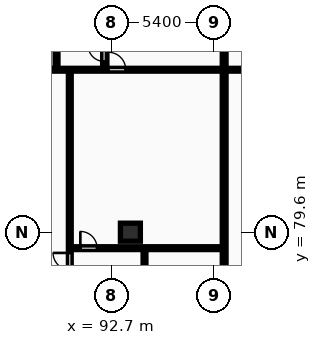
"""IFC4 building model, lengths in metres.
Left out: names, types, materials, properties, quantities, classifications, styles, units other than length and angle.
Written with IfcOpenShell. Run it as: python <this file> out.ifc"""

import sys

from ifc_helpers import new_model, si_unit, direction, frame, frame_2d, origin, origin_2d, place, context, subcontext, project, spatial, rectangle, extrude, element, fill, save


model = new_model("IFC4")
c1 = context("Model", 3, precision=1e-05, world=origin(), true_north=direction((0.0, 1.0)))
c2 = subcontext(c1, "Body", "Model", "MODEL_VIEW")
j1 = project(units=[si_unit("LENGTHUNIT", "METRE"), si_unit("PLANEANGLEUNIT", "RADIAN")], contexts=[c1])
p1 = place(None, origin())
s1 = spatial("IfcSite", under=j1, at=p1, CompositionType="ELEMENT")
p2 = place(p1, origin())
s2 = spatial("IfcBuilding", under=s1, at=p2, CompositionType="ELEMENT")
p3 = place(p2, frame((0.0, 0.0, 24.0)))
s3 = spatial("IfcBuildingStorey", under=s2, at=p3, CompositionType="ELEMENT", Elevation=24.0)
p4 = place(p3, frame((93.7, 79.6, 0.0), z_axis=(0.0, 0.0, 1.0), x_axis=(1.0, 0.0, 0.0)))
e1 = element("IfcColumn", 1, at=p4, inside=s3, PredefinedType="COLUMN", context=c2, shape_type="SweptSolid", body=[
    extrude(rectangle(XDim=1.05, YDim=0.95, at=origin_2d()), origin(), (0.0, 0.0, 1.0), 3.25),
])
p5 = place(p3, frame((98.635, 69.43, 0.0), z_axis=(0.0, 0.0, 1.0), x_axis=(0.0, 1.0, 0.0)))
e2 = element("IfcWall", 2, at=p5, inside=s3, PredefinedType="PARTITIONING", context=c2, shape_type="SweptSolid", body=[
    extrude(rectangle(XDim=29.07, YDim=0.2, at=frame_2d((14.535, 0.0))), origin(), (0.0, 0.0, 1.0), 2.97),
])
p6 = place(p3, frame((94.443, 69.41, 0.0), z_axis=(0.0, 0.0, 1.0), x_axis=(0.0, 1.0, 0.0)))
e3 = element("IfcWall", 3, at=p6, inside=s3, PredefinedType="PARTITIONING", context=c2, shape_type="SweptSolid", body=[
    extrude(rectangle(XDim=9.35, YDim=0.15, at=frame_2d((4.675, 0.0))), origin(), (0.0, 0.0, 1.0), 2.97),
])
p7 = place(p6, frame((4.255, 0.0, 0.0)))
e4 = element("IfcOpeningElement", 4, at=p7, cuts=e3, PredefinedType="OPENING", context=c2, shape_type="SweptSolid", body=[
    extrude(rectangle(XDim=0.84, YDim=2.04, at=frame_2d((0.42, 1.02))), frame((0.0, 0.085, 0.0), z_axis=(0.0, -1.0, 0.0), x_axis=(1.0, 0.0, 0.0)), (0.0, 0.0, 1.0), 0.17),
])
p8 = place(p3, frame((90.572, 78.76, 0.0), z_axis=(0.0, 0.0, 1.0), x_axis=(1.0, 0.0, 0.0)))
e5 = element("IfcWall", 5, at=p8, inside=s3, PredefinedType="PARTITIONING", context=c2, shape_type="SweptSolid", body=[
    extrude(rectangle(XDim=7.983, YDim=0.15, at=frame_2d((3.992, 0.0))), origin(), (0.0, 0.0, 1.0), 2.97),
])
p9 = place(p8, frame((0.495, 0.0, 0.0)))
e6 = element("IfcOpeningElement", 6, at=p9, cuts=e5, PredefinedType="OPENING", context=c2, shape_type="SweptSolid", body=[
    extrude(rectangle(XDim=0.88, YDim=2.06, at=frame_2d((0.44, 1.03))), frame((0.0, 0.085, 0.0), z_axis=(0.0, -1.0, 0.0), x_axis=(1.0, 0.0, 0.0)), (0.0, 0.0, 1.0), 0.17),
])
p10 = place(p3, frame((90.511, 69.41, 0.0), z_axis=(0.0, 0.0, 1.0), x_axis=(0.0, 1.0, 0.0)))
e7 = element("IfcWall", 7, at=p10, inside=s3, PredefinedType="PARTITIONING", context=c2, shape_type="SweptSolid", body=[
    extrude(rectangle(XDim=18.7, YDim=0.15, at=frame_2d((9.35, 0.0))), origin(), (0.0, 0.0, 1.0), 2.97),
])
p11 = place(p10, frame((8.22, 0.0, 0.0)))
e8 = element("IfcOpeningElement", 8, at=p11, cuts=e7, PredefinedType="OPENING", context=c2, shape_type="SweptSolid", body=[
    extrude(rectangle(XDim=0.88, YDim=2.06, at=frame_2d((0.44, 1.03))), frame((0.0, 0.085, 0.0), z_axis=(0.0, -1.0, 0.0), x_axis=(1.0, 0.0, 0.0)), (0.0, 0.0, 1.0), 0.17),
])
p12 = place(p3, frame((89.815, 88.19, 0.0), z_axis=(0.0, 0.0, 1.0), x_axis=(0.0, 1.0, 0.0)))
e9 = element("IfcWall", 9, at=p12, inside=s3, PredefinedType="PARTITIONING", context=c2, shape_type="SweptSolid", body=[
    extrude(rectangle(XDim=5.0, YDim=0.15, at=frame_2d((2.5, 0.0))), origin(), (0.0, 0.0, 1.0), 2.97),
])
p13 = place(p12, frame((2.08, 0.0, 0.0)))
e10 = element("IfcOpeningElement", 10, at=p13, cuts=e9, PredefinedType="OPENING", context=c2, shape_type="SweptSolid", body=[
    extrude(rectangle(XDim=0.84, YDim=2.04, at=frame_2d((0.42, 1.02))), frame((0.0, 0.085, 0.0), z_axis=(0.0, -1.0, 0.0), x_axis=(1.0, 0.0, 0.0)), (0.0, 0.0, 1.0), 0.17),
])
p14 = place(p3, frame((92.315, 88.19, 0.0), z_axis=(0.0, 0.0, 1.0), x_axis=(0.0, 1.0, 0.0)))
e11 = element("IfcWall", 11, at=p14, inside=s3, PredefinedType="PARTITIONING", context=c2, shape_type="SweptSolid", body=[
    extrude(rectangle(XDim=5.0, YDim=0.15, at=frame_2d((2.5, 0.0))), origin(), (0.0, 0.0, 1.0), 2.97),
])
p15 = place(p14, frame((0.4, 0.0, 0.0)))
e12 = element("IfcOpeningElement", 12, at=p15, cuts=e11, PredefinedType="OPENING", context=c2, shape_type="SweptSolid", body=[
    extrude(rectangle(XDim=0.84, YDim=2.04, at=frame_2d((0.42, 1.02))), frame((0.0, 0.085, 0.0), z_axis=(0.0, -1.0, 0.0), x_axis=(1.0, 0.0, 0.0)), (0.0, 0.0, 1.0), 0.17),
])
p16 = place(p3, frame((86.622, 88.15, 0.0), z_axis=(0.0, 0.0, 1.0), x_axis=(1.0, 0.0, 0.0)))
e13 = element("IfcWall", 13, at=p16, inside=s3, PredefinedType="PARTITIONING", context=c2, shape_type="SweptSolid", body=[
    extrude(rectangle(XDim=11.933, YDim=0.15, at=frame_2d((5.967, 0.0))), origin(), (0.0, 0.0, 1.0), 2.97),
])
p17 = place(p16, frame((5.914, 0.0, 0.0)))
e14 = element("IfcOpeningElement", 14, at=p17, cuts=e13, PredefinedType="OPENING", context=c2, shape_type="SweptSolid", body=[
    extrude(rectangle(XDim=0.92, YDim=2.08, at=frame_2d((0.46, 1.04))), frame((0.0, 0.085, 0.0), z_axis=(0.0, -1.0, 0.0), x_axis=(1.0, 0.0, 0.0)), (0.0, 0.0, 1.0), 0.17),
])
p18 = place(p3, frame((98.715, 88.15, 0.0), z_axis=(0.0, 0.0, 1.0), x_axis=(1.0, 0.0, 0.0)))
e15 = element("IfcWall", 15, at=p18, inside=s3, PredefinedType="PARTITIONING", context=c2, shape_type="SweptSolid", body=[
    extrude(rectangle(XDim=9.918, YDim=0.15, at=frame_2d((4.959, 0.0))), origin(), (0.0, 0.0, 1.0), 2.97),
])
p19 = place(p18, frame((4.499, 0.0, 0.0)))
e16 = element("IfcOpeningElement", 16, at=p19, cuts=e15, PredefinedType="OPENING", context=c2, shape_type="SweptSolid", body=[
    extrude(rectangle(XDim=0.92, YDim=2.08, at=frame_2d((0.46, 1.04))), frame((0.0, 0.085, 0.0), z_axis=(0.0, -1.0, 0.0), x_axis=(1.0, 0.0, 0.0)), (0.0, 0.0, 1.0), 0.17),
])
p20 = place(p9, origin())
e17 = element("IfcDoor", 17, at=p20, inside=s3, OperationType="SINGLE_SWING_LEFT", PredefinedType="DOOR", context=c2, shape_type="SweptSolid", body=[
    extrude(rectangle(XDim=0.88, YDim=2.06, at=frame_2d((0.44, 1.03))), frame((0.0, 0.025, 0.0), z_axis=(0.0, -1.0, 0.0), x_axis=(1.0, 0.0, 0.0)), (0.0, 0.0, 1.0), 0.05),
])
fill(e6, e17)
p21 = place(p11, origin())
e18 = element("IfcDoor", 18, at=p21, inside=s3, OperationType="SINGLE_SWING_RIGHT", PredefinedType="DOOR", context=c2, shape_type="SweptSolid", body=[
    extrude(rectangle(XDim=0.88, YDim=2.06, at=frame_2d((0.44, 1.03))), frame((0.0, 0.025, 0.0), z_axis=(0.0, -1.0, 0.0), x_axis=(1.0, 0.0, 0.0)), (0.0, 0.0, 1.0), 0.05),
])
fill(e8, e18)
p22 = place(p15, origin())
e19 = element("IfcDoor", 19, at=p22, inside=s3, OperationType="SINGLE_SWING_RIGHT", PredefinedType="DOOR", context=c2, shape_type="SweptSolid", body=[
    extrude(rectangle(XDim=0.84, YDim=2.04, at=frame_2d((0.42, 1.02))), frame((0.0, 0.025, 0.0), z_axis=(0.0, -1.0, 0.0), x_axis=(1.0, 0.0, 0.0)), (0.0, 0.0, 1.0), 0.05),
])
fill(e12, e19)
p23 = place(p17, origin())
e20 = element("IfcDoor", 20, at=p23, inside=s3, OperationType="SINGLE_SWING_LEFT", PredefinedType="DOOR", context=c2, shape_type="SweptSolid", body=[
    extrude(rectangle(XDim=0.92, YDim=2.08, at=frame_2d((0.46, 1.04))), frame((0.0, 0.025, 0.0), z_axis=(0.0, -1.0, 0.0), x_axis=(1.0, 0.0, 0.0)), (0.0, 0.0, 1.0), 0.05),
])
fill(e14, e20)
save(model, sys.argv[1])
